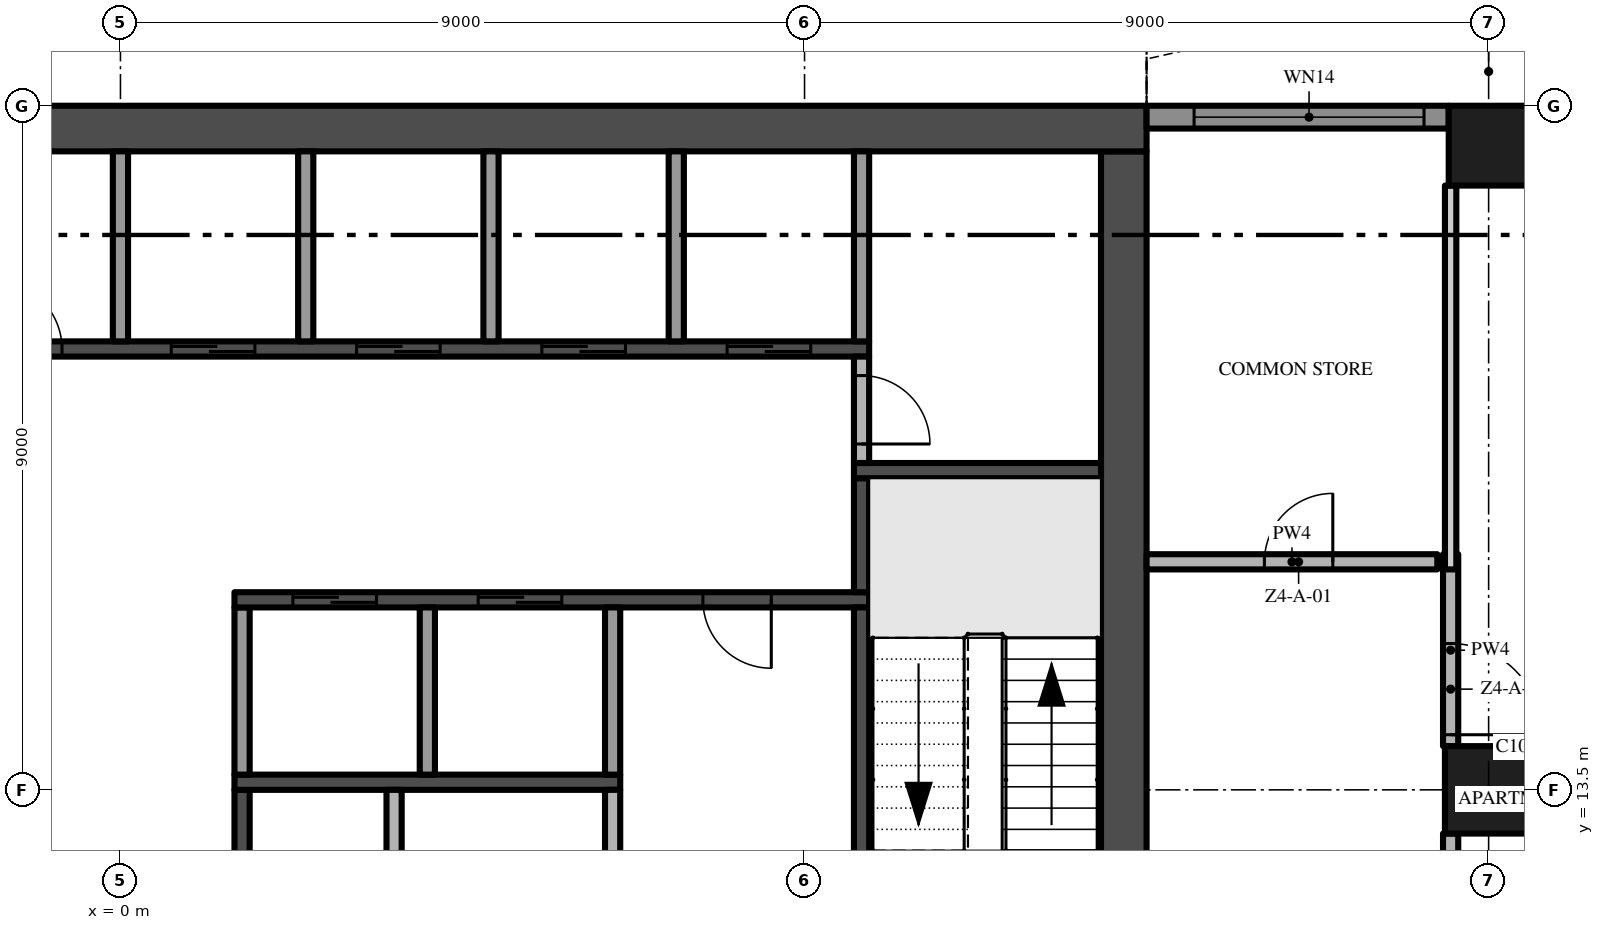
"""IFC4 building model, lengths in metres.
Left out: names, types, materials, properties, quantities, classifications, styles, units other than length and angle.
Written with IfcOpenShell. Run it as: python <this file> out.ifc"""

import sys

from ifc_helpers import new_model, si_unit, direction, frame, frame_2d, origin, origin_2d, place, context, subcontext, project, spatial, polyline, rectangle, outline, extrude, element, fill, save


model = new_model("IFC4")
c1 = context("Model", 3, precision=1e-05, world=origin(), true_north=direction((0.0, 1.0)))
c2 = subcontext(c1, "Body", "Model", "MODEL_VIEW")
j1 = project(units=[si_unit("LENGTHUNIT", "METRE"), si_unit("PLANEANGLEUNIT", "RADIAN")], contexts=[c1])
p1 = place(None, origin())
s1 = spatial("IfcSite", under=j1, at=p1, CompositionType="ELEMENT")
p2 = place(p1, origin())
s2 = spatial("IfcBuilding", under=s1, at=p2, CompositionType="ELEMENT")
p3 = place(p2, frame((0.0, 0.0, 184.4)))
s3 = spatial("IfcBuildingStorey", under=s2, at=p3, CompositionType="ELEMENT", Elevation=184.4)
p4 = place(p3, frame((13.2, 5.1, -0.3), z_axis=(0.0, 0.0, 1.0), x_axis=(0.0, 1.0, 0.0)))
e1 = element("IfcWall", 1, at=p4, inside=s3, PredefinedType="SHEAR", context=c2, shape_type="SweptSolid", body=[
    extrude(rectangle(XDim=16.8, YDim=0.6, at=frame_2d((8.4, 0.0))), origin(), (0.0, 0.0, 1.0), 3.8),
])
p5 = place(p4, frame((6.3, 0.0, 0.3)))
e2 = element("IfcOpeningElement", 2, at=p5, cuts=e1, PredefinedType="OPENING", context=c2, shape_type="SweptSolid", body=[
    extrude(rectangle(XDim=1.2, YDim=2.2, at=frame_2d((0.6, 1.1))), frame((0.0, 0.31, 0.0), z_axis=(0.0, -1.0, 0.0), x_axis=(1.0, 0.0, 0.0)), (0.0, 0.0, 1.0), 0.62),
])
p6 = place(p3, frame((13.5, 22.2, -0.3), z_axis=(0.0, 0.0, 1.0), x_axis=(-1.0, 0.0, 0.0)))
e3 = element("IfcWall", 3, at=p6, inside=s3, PredefinedType="SHEAR", context=c2, shape_type="SweptSolid", body=[
    extrude(rectangle(XDim=27.0, YDim=0.6, at=frame_2d((13.5, 0.0))), origin(), (0.0, 0.0, 1.0), 3.8),
])
p7 = place(p3, frame((18.0, 13.5, 0.0), z_axis=(0.0, 0.0, 1.0), x_axis=(1.0, 0.0, 0.0)))
e4 = element("IfcColumn", 4, at=p7, inside=s3, PredefinedType="COLUMN", context=c2, shape_type="SweptSolid", body=[
    extrude(rectangle(XDim=1.15, YDim=1.15, at=origin_2d()), origin(), (0.0, 0.0, 1.0), 3.5),
])
p8 = place(p3, frame((18.0, 21.975, 0.0), z_axis=(0.0, 0.0, 1.0), x_axis=(1.0, 0.0, 0.0)))
e5 = element("IfcColumn", 5, at=p8, inside=s3, PredefinedType="COLUMN", context=c2, shape_type="SweptSolid", body=[
    extrude(rectangle(XDim=1.05, YDim=1.05, at=origin_2d()), origin(), (0.0, 0.0, 1.0), 3.5),
])
p9 = place(p3, frame((13.5, 22.35, 0.0), z_axis=(0.0, 0.0, 1.0), x_axis=(1.0, 0.0, 0.0)))
e6 = element("IfcWall", 6, at=p9, inside=s3, PredefinedType="SOLIDWALL", context=c2, shape_type="SweptSolid", body=[
    extrude(rectangle(XDim=3.975, YDim=0.3, at=frame_2d((1.988, 0.0))), origin(), (0.0, 0.0, 1.0), 3.5),
])
p10 = place(p9, frame((0.625, 0.0, 0.45)))
e7 = element("IfcOpeningElement", 7, at=p10, cuts=e6, PredefinedType="OPENING", context=c2, shape_type="SweptSolid", body=[
    extrude(rectangle(XDim=3.025, YDim=2.65, at=frame_2d((1.512, 1.325))), frame((0.0, 0.16, 0.0), z_axis=(0.0, -1.0, 0.0), x_axis=(1.0, 0.0, 0.0)), (0.0, 0.0, 1.0), 0.32),
])
p11 = place(p3, origin())
e8 = element("IfcWall", 8, at=p11, inside=s3, PredefinedType="USERDEFINED", context=c2, shape_type="SweptSolid", body=[
    extrude(outline(polyline([(22.5, 25.149), (21.0, 25.485), (20.625, 25.5), (19.5, 25.369), (18.0, 24.845), (16.5, 24.112), (15.0, 23.451), (13.5, 23.115), (13.555, 22.871), (15.079, 23.213), (16.605, 23.885), (18.096, 24.614), (19.556, 25.124), (20.635, 25.249), (20.967, 25.236), (22.445, 24.905), (22.5, 25.149)])), origin(), (0.0, 0.0, 1.0), 0.9),
])
p12 = place(p3, frame((-9.85, 19.3, 0.0), z_axis=(0.0, 0.0, 1.0), x_axis=(1.0, 0.0, 0.0)))
e9 = element("IfcWall", 9, at=p12, inside=s3, PredefinedType="SHEAR", context=c2, shape_type="SweptSolid", body=[
    extrude(rectangle(XDim=19.7, YDim=0.2, at=frame_2d((9.85, 0.0))), origin(), (0.0, 0.0, 1.0), 3.5),
])
p13 = place(p12, frame((10.519, 0.0, 0.0)))
e10 = element("IfcOpeningElement", 10, at=p13, cuts=e9, PredefinedType="OPENING", context=c2, shape_type="SweptSolid", body=[
    extrude(rectangle(XDim=1.1, YDim=2.1, at=frame_2d((0.55, 1.05))), frame((0.0, 0.11, 0.0), z_axis=(0.0, -1.0, 0.0), x_axis=(1.0, 0.0, 0.0)), (0.0, 0.0, 1.0), 0.22),
])
p14 = place(p12, frame((12.956, 0.0, 0.0)))
e11 = element("IfcOpeningElement", 11, at=p14, cuts=e9, PredefinedType="OPENING", context=c2, shape_type="SweptSolid", body=[
    extrude(rectangle(XDim=1.1, YDim=2.1, at=frame_2d((0.55, 1.05))), frame((0.0, 0.11, 0.0), z_axis=(0.0, -1.0, 0.0), x_axis=(1.0, 0.0, 0.0)), (0.0, 0.0, 1.0), 0.22),
])
p15 = place(p12, frame((15.394, 0.0, 0.0)))
e12 = element("IfcOpeningElement", 12, at=p15, cuts=e9, PredefinedType="OPENING", context=c2, shape_type="SweptSolid", body=[
    extrude(rectangle(XDim=1.1, YDim=2.1, at=frame_2d((0.55, 1.05))), frame((0.0, 0.11, 0.0), z_axis=(0.0, -1.0, 0.0), x_axis=(1.0, 0.0, 0.0)), (0.0, 0.0, 1.0), 0.22),
])
p16 = place(p12, frame((17.831, 0.0, 0.0)))
e13 = element("IfcOpeningElement", 13, at=p16, cuts=e9, PredefinedType="OPENING", context=c2, shape_type="SweptSolid", body=[
    extrude(rectangle(XDim=1.1, YDim=2.1, at=frame_2d((0.55, 1.05))), frame((0.0, 0.11, 0.0), z_axis=(0.0, -1.0, 0.0), x_axis=(1.0, 0.0, 0.0)), (0.0, 0.0, 1.0), 0.22),
])
p17 = place(p12, frame((3.306, 0.0, 0.0)))
e14 = element("IfcOpeningElement", 14, at=p17, cuts=e9, PredefinedType="OPENING", context=c2, shape_type="SweptSolid", body=[
    extrude(rectangle(XDim=0.9, YDim=2.1, at=frame_2d((0.45, 1.05))), frame((0.0, 0.11, 0.0), z_axis=(0.0, -1.0, 0.0), x_axis=(1.0, 0.0, 0.0)), (0.0, 0.0, 1.0), 0.22),
])
p18 = place(p12, frame((8.181, 0.0, 0.0)))
e15 = element("IfcOpeningElement", 15, at=p18, cuts=e9, PredefinedType="OPENING", context=c2, shape_type="SweptSolid", body=[
    extrude(rectangle(XDim=0.9, YDim=2.1, at=frame_2d((0.45, 1.05))), frame((0.0, 0.11, 0.0), z_axis=(0.0, -1.0, 0.0), x_axis=(1.0, 0.0, 0.0)), (0.0, 0.0, 1.0), 0.22),
])
p19 = place(p3, frame((0.0, 19.4, 0.0), z_axis=(0.0, 0.0, 1.0), x_axis=(0.0, 1.0, 0.0)))
e16 = element("IfcWall", 16, at=p19, inside=s3, PredefinedType="PARTITIONING", context=c2, shape_type="SweptSolid", body=[
    extrude(rectangle(XDim=2.5, YDim=0.2, at=frame_2d((1.25, 0.0))), origin(), (0.0, 0.0, 1.0), 3.5),
])
p20 = place(p3, frame((1.6, 13.5, 0.0), z_axis=(0.0, 0.0, 1.0), x_axis=(0.0, -1.0, 0.0)))
e17 = element("IfcWall", 17, at=p20, inside=s3, PredefinedType="SHEAR", context=c2, shape_type="SweptSolid", body=[
    extrude(rectangle(XDim=8.4, YDim=0.2, at=frame_2d((4.2, 0.0))), origin(), (0.0, 0.0, 1.0), 3.5),
])
p21 = place(p20, frame((3.35, 0.0, 0.0)))
e18 = element("IfcOpeningElement", 18, at=p21, cuts=e17, PredefinedType="OPENING", context=c2, shape_type="SweptSolid", body=[
    extrude(rectangle(XDim=0.9, YDim=2.1, at=frame_2d((0.45, 1.05))), frame((0.0, 0.11, 0.0), z_axis=(0.0, -1.0, 0.0), x_axis=(1.0, 0.0, 0.0)), (0.0, 0.0, 1.0), 0.22),
])
p22 = place(p3, frame((1.5, 13.6, 0.0), z_axis=(0.0, 0.0, 1.0), x_axis=(1.0, 0.0, 0.0)))
e19 = element("IfcWall", 19, at=p22, inside=s3, PredefinedType="SHEAR", context=c2, shape_type="SweptSolid", body=[
    extrude(rectangle(XDim=5.075, YDim=0.2, at=frame_2d((2.538, 0.0))), origin(), (0.0, 0.0, 1.0), 3.5),
])
p23 = place(p3, frame((1.6, 13.7, 0.0), z_axis=(0.0, 0.0, 1.0), x_axis=(0.0, 1.0, 0.0)))
e20 = element("IfcWall", 20, at=p23, inside=s3, PredefinedType="PARTITIONING", context=c2, shape_type="SweptSolid", body=[
    extrude(rectangle(XDim=2.2, YDim=0.2, at=frame_2d((1.1, 0.0))), origin(), (0.0, 0.0, 1.0), 3.5),
])
p24 = place(p3, frame((9.85, 16.0, 0.0), z_axis=(0.0, 0.0, 1.0), x_axis=(-1.0, 0.0, 0.0)))
e21 = element("IfcWall", 21, at=p24, inside=s3, PredefinedType="SHEAR", context=c2, shape_type="SweptSolid", body=[
    extrude(rectangle(XDim=8.35, YDim=0.2, at=frame_2d((4.175, 0.0))), origin(), (0.0, 0.0, 1.0), 3.5),
])
p25 = place(p24, frame((6.481, 0.0, 0.0)))
e22 = element("IfcOpeningElement", 22, at=p25, cuts=e21, PredefinedType="OPENING", context=c2, shape_type="SweptSolid", body=[
    extrude(rectangle(XDim=1.1, YDim=2.1, at=frame_2d((0.55, 1.05))), frame((0.0, 0.11, 0.0), z_axis=(0.0, -1.0, 0.0), x_axis=(1.0, 0.0, 0.0)), (0.0, 0.0, 1.0), 0.22),
])
p26 = place(p24, frame((4.044, 0.0, 0.0)))
e23 = element("IfcOpeningElement", 23, at=p26, cuts=e21, PredefinedType="OPENING", context=c2, shape_type="SweptSolid", body=[
    extrude(rectangle(XDim=1.1, YDim=2.1, at=frame_2d((0.55, 1.05))), frame((0.0, 0.11, 0.0), z_axis=(0.0, -1.0, 0.0), x_axis=(1.0, 0.0, 0.0)), (0.0, 0.0, 1.0), 0.22),
])
p27 = place(p24, frame((1.288, 0.0, 0.0)))
e24 = element("IfcOpeningElement", 24, at=p27, cuts=e21, PredefinedType="OPENING", context=c2, shape_type="SweptSolid", body=[
    extrude(rectangle(XDim=0.9, YDim=2.1, at=frame_2d((0.45, 1.05))), frame((0.0, 0.11, 0.0), z_axis=(0.0, -1.0, 0.0), x_axis=(1.0, 0.0, 0.0)), (0.0, 0.0, 1.0), 0.22),
])
p28 = place(p3, frame((2.438, 19.4, 0.0), z_axis=(0.0, 0.0, 1.0), x_axis=(0.0, 1.0, 0.0)))
e25 = element("IfcWall", 25, at=p28, inside=s3, PredefinedType="PARTITIONING", context=c2, shape_type="SweptSolid", body=[
    extrude(rectangle(XDim=2.5, YDim=0.2, at=frame_2d((1.25, 0.0))), origin(), (0.0, 0.0, 1.0), 3.5),
])
p29 = place(p3, frame((3.6, 13.5, 0.0), z_axis=(0.0, 0.0, 1.0), x_axis=(0.0, -1.0, 0.0)))
e26 = element("IfcWall", 26, at=p29, inside=s3, PredefinedType="PARTITIONING", context=c2, shape_type="SweptSolid", body=[
    extrude(rectangle(XDim=8.4, YDim=0.2, at=frame_2d((4.2, 0.0))), origin(), (0.0, 0.0, 1.0), 3.5),
])
p30 = place(p29, frame((3.75, 0.0, 0.0)))
e27 = element("IfcOpeningElement", 27, at=p30, cuts=e26, PredefinedType="OPENING", context=c2, shape_type="SweptSolid", body=[
    extrude(rectangle(XDim=0.9, YDim=2.1, at=frame_2d((0.45, 1.05))), frame((0.0, 0.11, 0.0), z_axis=(0.0, -1.0, 0.0), x_axis=(1.0, 0.0, 0.0)), (0.0, 0.0, 1.0), 0.22),
])
p31 = place(p3, frame((4.037, 13.7, 0.0), z_axis=(0.0, 0.0, 1.0), x_axis=(0.0, 1.0, 0.0)))
e28 = element("IfcWall", 28, at=p31, inside=s3, PredefinedType="PARTITIONING", context=c2, shape_type="SweptSolid", body=[
    extrude(rectangle(XDim=2.2, YDim=0.2, at=frame_2d((1.1, 0.0))), origin(), (0.0, 0.0, 1.0), 3.5),
])
p32 = place(p3, frame((4.875, 19.4, 0.0), z_axis=(0.0, 0.0, 1.0), x_axis=(0.0, 1.0, 0.0)))
e29 = element("IfcWall", 29, at=p32, inside=s3, PredefinedType="PARTITIONING", context=c2, shape_type="SweptSolid", body=[
    extrude(rectangle(XDim=2.5, YDim=0.2, at=frame_2d((1.25, 0.0))), origin(), (0.0, 0.0, 1.0), 3.5),
])
p33 = place(p3, frame((6.475, 12.3, 0.0), z_axis=(0.0, 0.0, 1.0), x_axis=(0.0, 1.0, 0.0)))
e30 = element("IfcWall", 30, at=p33, inside=s3, PredefinedType="PARTITIONING", context=c2, shape_type="SweptSolid", body=[
    extrude(rectangle(XDim=1.2, YDim=0.2, at=frame_2d((0.6, 0.0))), origin(), (0.0, 0.0, 1.0), 3.5),
])
p34 = place(p3, frame((6.475, 13.7, 0.0), z_axis=(0.0, 0.0, 1.0), x_axis=(0.0, 1.0, 0.0)))
e31 = element("IfcWall", 31, at=p34, inside=s3, PredefinedType="PARTITIONING", context=c2, shape_type="SweptSolid", body=[
    extrude(rectangle(XDim=2.2, YDim=0.2, at=frame_2d((1.1, 0.0))), origin(), (0.0, 0.0, 1.0), 3.5),
])
p35 = place(p3, frame((7.312, 19.4, 0.0), z_axis=(0.0, 0.0, 1.0), x_axis=(0.0, 1.0, 0.0)))
e32 = element("IfcWall", 32, at=p35, inside=s3, PredefinedType="PARTITIONING", context=c2, shape_type="SweptSolid", body=[
    extrude(rectangle(XDim=2.5, YDim=0.2, at=frame_2d((1.25, 0.0))), origin(), (0.0, 0.0, 1.0), 3.5),
])
p36 = place(p3, frame((9.75, 12.3, 0.0), z_axis=(0.0, 0.0, 1.0), x_axis=(0.0, 1.0, 0.0)))
e33 = element("IfcWall", 33, at=p36, inside=s3, PredefinedType="SHEAR", context=c2, shape_type="SweptSolid", body=[
    extrude(rectangle(XDim=3.6, YDim=0.2, at=frame_2d((1.8, 0.0))), origin(), (0.0, 0.0, 1.0), 3.5),
])
p37 = place(p3, frame((9.75, 16.1, 0.0), z_axis=(0.0, 0.0, 1.0), x_axis=(0.0, 1.0, 0.0)))
e34 = element("IfcWall", 34, at=p37, inside=s3, PredefinedType="SHEAR", context=c2, shape_type="SweptSolid", body=[
    extrude(rectangle(XDim=1.5, YDim=0.2, at=frame_2d((0.75, 0.0))), origin(), (0.0, 0.0, 1.0), 3.5),
])
p38 = place(p3, frame((9.65, 17.7, 0.0), z_axis=(0.0, 0.0, 1.0), x_axis=(1.0, 0.0, 0.0)))
e35 = element("IfcWall", 35, at=p38, inside=s3, PredefinedType="SHEAR", context=c2, shape_type="SweptSolid", body=[
    extrude(rectangle(XDim=3.25, YDim=0.2, at=frame_2d((1.625, 0.0))), origin(), (0.0, 0.0, 1.0), 3.5),
])
p39 = place(p3, frame((9.75, 19.2, 0.0), z_axis=(0.0, 0.0, 1.0), x_axis=(0.0, -1.0, 0.0)))
e36 = element("IfcWall", 36, at=p39, inside=s3, PredefinedType="PARTITIONING", context=c2, shape_type="SweptSolid", body=[
    extrude(rectangle(XDim=1.4, YDim=0.2, at=frame_2d((0.7, 0.0))), origin(), (0.0, 0.0, 1.0), 3.5),
])
p40 = place(p39, frame((0.25, 0.0, 0.0)))
e37 = element("IfcOpeningElement", 37, at=p40, cuts=e36, PredefinedType="OPENING", context=c2, shape_type="SweptSolid", body=[
    extrude(rectangle(XDim=0.9, YDim=2.1, at=frame_2d((0.45, 1.05))), frame((0.0, 0.11, 0.0), z_axis=(0.0, -1.0, 0.0), x_axis=(1.0, 0.0, 0.0)), (0.0, 0.0, 1.0), 0.22),
])
p41 = place(p3, frame((9.75, 19.4, 0.0), z_axis=(0.0, 0.0, 1.0), x_axis=(0.0, 1.0, 0.0)))
e38 = element("IfcWall", 38, at=p41, inside=s3, PredefinedType="PARTITIONING", context=c2, shape_type="SweptSolid", body=[
    extrude(rectangle(XDim=2.5, YDim=0.2, at=frame_2d((1.25, 0.0))), origin(), (0.0, 0.0, 1.0), 3.5),
])
p42 = place(p3, frame((13.5, 16.5, 0.0), z_axis=(0.0, 0.0, 1.0), x_axis=(1.0, 0.0, 0.0)))
e39 = element("IfcWall", 39, at=p42, inside=s3, PredefinedType="PARTITIONING", context=c2, shape_type="SweptSolid", body=[
    extrude(rectangle(XDim=3.825, YDim=0.2, at=frame_2d((1.913, 0.0))), origin(), (0.0, 0.0, 1.0), 3.5),
])
p43 = place(p42, frame((1.55, 0.0, 0.0)))
e40 = element("IfcOpeningElement", 40, at=p43, cuts=e39, PredefinedType="OPENING", context=c2, shape_type="SweptSolid", body=[
    extrude(rectangle(XDim=0.9, YDim=2.1, at=frame_2d((0.45, 1.05))), frame((0.0, 0.11, 0.0), z_axis=(0.0, -1.0, 0.0), x_axis=(1.0, 0.0, 0.0)), (0.0, 0.0, 1.0), 0.22),
])
p44 = place(p3, frame((17.5, 5.075, 0.0), z_axis=(0.0, 0.0, 1.0), x_axis=(0.0, 1.0, 0.0)))
e41 = element("IfcWall", 41, at=p44, inside=s3, PredefinedType="PARTITIONING", context=c2, shape_type="SweptSolid", body=[
    extrude(rectangle(XDim=7.85, YDim=0.2, at=frame_2d((3.925, 0.0))), origin(), (0.0, 0.0, 1.0), 3.5),
])
p45 = place(p3, frame((17.5, 16.6, 0.0), z_axis=(0.0, 0.0, 1.0), x_axis=(0.0, -1.0, 0.0)))
e42 = element("IfcWall", 42, at=p45, inside=s3, PredefinedType="PARTITIONING", context=c2, shape_type="SweptSolid", body=[
    extrude(rectangle(XDim=2.525, YDim=0.2, at=frame_2d((1.262, 0.0))), origin(), (0.0, 0.0, 1.0), 3.5),
])
p46 = place(p45, frame((1.175, 0.0, 0.0)))
e43 = element("IfcOpeningElement", 43, at=p46, cuts=e42, PredefinedType="OPENING", context=c2, shape_type="SweptSolid", body=[
    extrude(rectangle(XDim=1.2, YDim=2.4, at=frame_2d((0.6, 1.2))), frame((0.0, 0.11, 0.0), z_axis=(0.0, -1.0, 0.0), x_axis=(1.0, 0.0, 0.0)), (0.0, 0.0, 1.0), 0.22),
])
p47 = place(p3, frame((17.5, 16.4, 0.0), z_axis=(0.0, 0.0, 1.0), x_axis=(0.0, 1.0, 0.0)))
e44 = element("IfcWall", 44, at=p47, inside=s3, PredefinedType="PARTITIONING", context=c2, shape_type="SweptSolid", body=[
    extrude(rectangle(XDim=5.05, YDim=0.15, at=frame_2d((2.525, 0.0))), origin(), (0.0, 0.0, 1.0), 3.5),
])
p48 = place(p10, origin())
e45 = element("IfcWindow", 45, at=p48, inside=s3, PartitioningType="SINGLE_PANEL", PredefinedType="WINDOW", context=c2, shape_type="SweptSolid", body=[
    extrude(rectangle(XDim=3.025, YDim=2.65, at=frame_2d((1.512, 1.325))), frame((0.0, 0.03, 0.0), z_axis=(0.0, -1.0, 0.0), x_axis=(1.0, 0.0, 0.0)), (0.0, 0.0, 1.0), 0.06),
])
fill(e7, e45)
p49 = place(p13, origin())
e46 = element("IfcDoor", 46, at=p49, inside=s3, OperationType="SLIDING_TO_RIGHT", PredefinedType="DOOR", context=c2, shape_type="SweptSolid", body=[
    extrude(rectangle(XDim=1.1, YDim=2.1, at=frame_2d((0.55, 1.05))), frame((0.0, 0.025, 0.0), z_axis=(0.0, -1.0, 0.0), x_axis=(1.0, 0.0, 0.0)), (0.0, 0.0, 1.0), 0.05),
])
fill(e10, e46)
p50 = place(p14, origin())
e47 = element("IfcDoor", 47, at=p50, inside=s3, OperationType="SLIDING_TO_RIGHT", PredefinedType="DOOR", context=c2, shape_type="SweptSolid", body=[
    extrude(rectangle(XDim=1.1, YDim=2.1, at=frame_2d((0.55, 1.05))), frame((0.0, 0.025, 0.0), z_axis=(0.0, -1.0, 0.0), x_axis=(1.0, 0.0, 0.0)), (0.0, 0.0, 1.0), 0.05),
])
fill(e11, e47)
p51 = place(p15, origin())
e48 = element("IfcDoor", 48, at=p51, inside=s3, OperationType="SLIDING_TO_RIGHT", PredefinedType="DOOR", context=c2, shape_type="SweptSolid", body=[
    extrude(rectangle(XDim=1.1, YDim=2.1, at=frame_2d((0.55, 1.05))), frame((0.0, 0.025, 0.0), z_axis=(0.0, -1.0, 0.0), x_axis=(1.0, 0.0, 0.0)), (0.0, 0.0, 1.0), 0.05),
])
fill(e12, e48)
p52 = place(p16, origin())
e49 = element("IfcDoor", 49, at=p52, inside=s3, OperationType="SLIDING_TO_RIGHT", PredefinedType="DOOR", context=c2, shape_type="SweptSolid", body=[
    extrude(rectangle(XDim=1.1, YDim=2.1, at=frame_2d((0.55, 1.05))), frame((0.0, 0.025, 0.0), z_axis=(0.0, -1.0, 0.0), x_axis=(1.0, 0.0, 0.0)), (0.0, 0.0, 1.0), 0.05),
])
fill(e13, e49)
p53 = place(p25, origin())
e50 = element("IfcDoor", 50, at=p53, inside=s3, OperationType="SLIDING_TO_RIGHT", PredefinedType="DOOR", context=c2, shape_type="SweptSolid", body=[
    extrude(rectangle(XDim=1.1, YDim=2.1, at=frame_2d((0.55, 1.05))), frame((0.0, 0.025, 0.0), z_axis=(0.0, -1.0, 0.0), x_axis=(1.0, 0.0, 0.0)), (0.0, 0.0, 1.0), 0.05),
])
fill(e22, e50)
p54 = place(p26, origin())
e51 = element("IfcDoor", 51, at=p54, inside=s3, OperationType="SLIDING_TO_RIGHT", PredefinedType="DOOR", context=c2, shape_type="SweptSolid", body=[
    extrude(rectangle(XDim=1.1, YDim=2.1, at=frame_2d((0.55, 1.05))), frame((0.0, 0.025, 0.0), z_axis=(0.0, -1.0, 0.0), x_axis=(1.0, 0.0, 0.0)), (0.0, 0.0, 1.0), 0.05),
])
fill(e23, e51)
p55 = place(p27, origin())
e52 = element("IfcDoor", 52, at=p55, inside=s3, OperationType="SINGLE_SWING_LEFT", PredefinedType="DOOR", context=c2, shape_type="SweptSolid", body=[
    extrude(rectangle(XDim=0.9, YDim=2.1, at=frame_2d((0.45, 1.05))), frame((0.0, 0.025, 0.0), z_axis=(0.0, -1.0, 0.0), x_axis=(1.0, 0.0, 0.0)), (0.0, 0.0, 1.0), 0.05),
])
fill(e24, e52)
p56 = place(p40, origin())
e53 = element("IfcDoor", 53, at=p56, inside=s3, OperationType="SINGLE_SWING_RIGHT", PredefinedType="DOOR", context=c2, shape_type="SweptSolid", body=[
    extrude(rectangle(XDim=0.9, YDim=2.1, at=frame_2d((0.45, 1.05))), frame((0.0, 0.025, 0.0), z_axis=(0.0, -1.0, 0.0), x_axis=(1.0, 0.0, 0.0)), (0.0, 0.0, 1.0), 0.05),
])
fill(e37, e53)
p57 = place(p18, origin())
e54 = element("IfcDoor", 54, at=p57, inside=s3, OperationType="SINGLE_SWING_LEFT", PredefinedType="DOOR", context=c2, shape_type="SweptSolid", body=[
    extrude(rectangle(XDim=0.9, YDim=2.1, at=frame_2d((0.45, 1.05))), frame((0.0, 0.025, 0.0), z_axis=(0.0, -1.0, 0.0), x_axis=(1.0, 0.0, 0.0)), (0.0, 0.0, 1.0), 0.05),
])
fill(e15, e54)
p58 = place(p43, origin())
e55 = element("IfcDoor", 55, at=p58, inside=s3, OperationType="SINGLE_SWING_RIGHT", PredefinedType="DOOR", context=c2, shape_type="SweptSolid", body=[
    extrude(rectangle(XDim=0.9, YDim=2.1, at=frame_2d((0.45, 1.05))), frame((0.0, 0.025, 0.0), z_axis=(0.0, -1.0, 0.0), x_axis=(1.0, 0.0, 0.0)), (0.0, 0.0, 1.0), 0.05),
])
fill(e40, e55)
p59 = place(p46, origin())
e56 = element("IfcDoor", 56, at=p59, inside=s3, OperationType="SINGLE_SWING_RIGHT", PredefinedType="DOOR", context=c2, shape_type="SweptSolid", body=[
    extrude(rectangle(XDim=1.2, YDim=2.4, at=frame_2d((0.6, 1.2))), frame((0.0, 0.025, 0.0), z_axis=(0.0, -1.0, 0.0), x_axis=(1.0, 0.0, 0.0)), (0.0, 0.0, 1.0), 0.05),
])
fill(e43, e56)
save(model, sys.argv[1])
